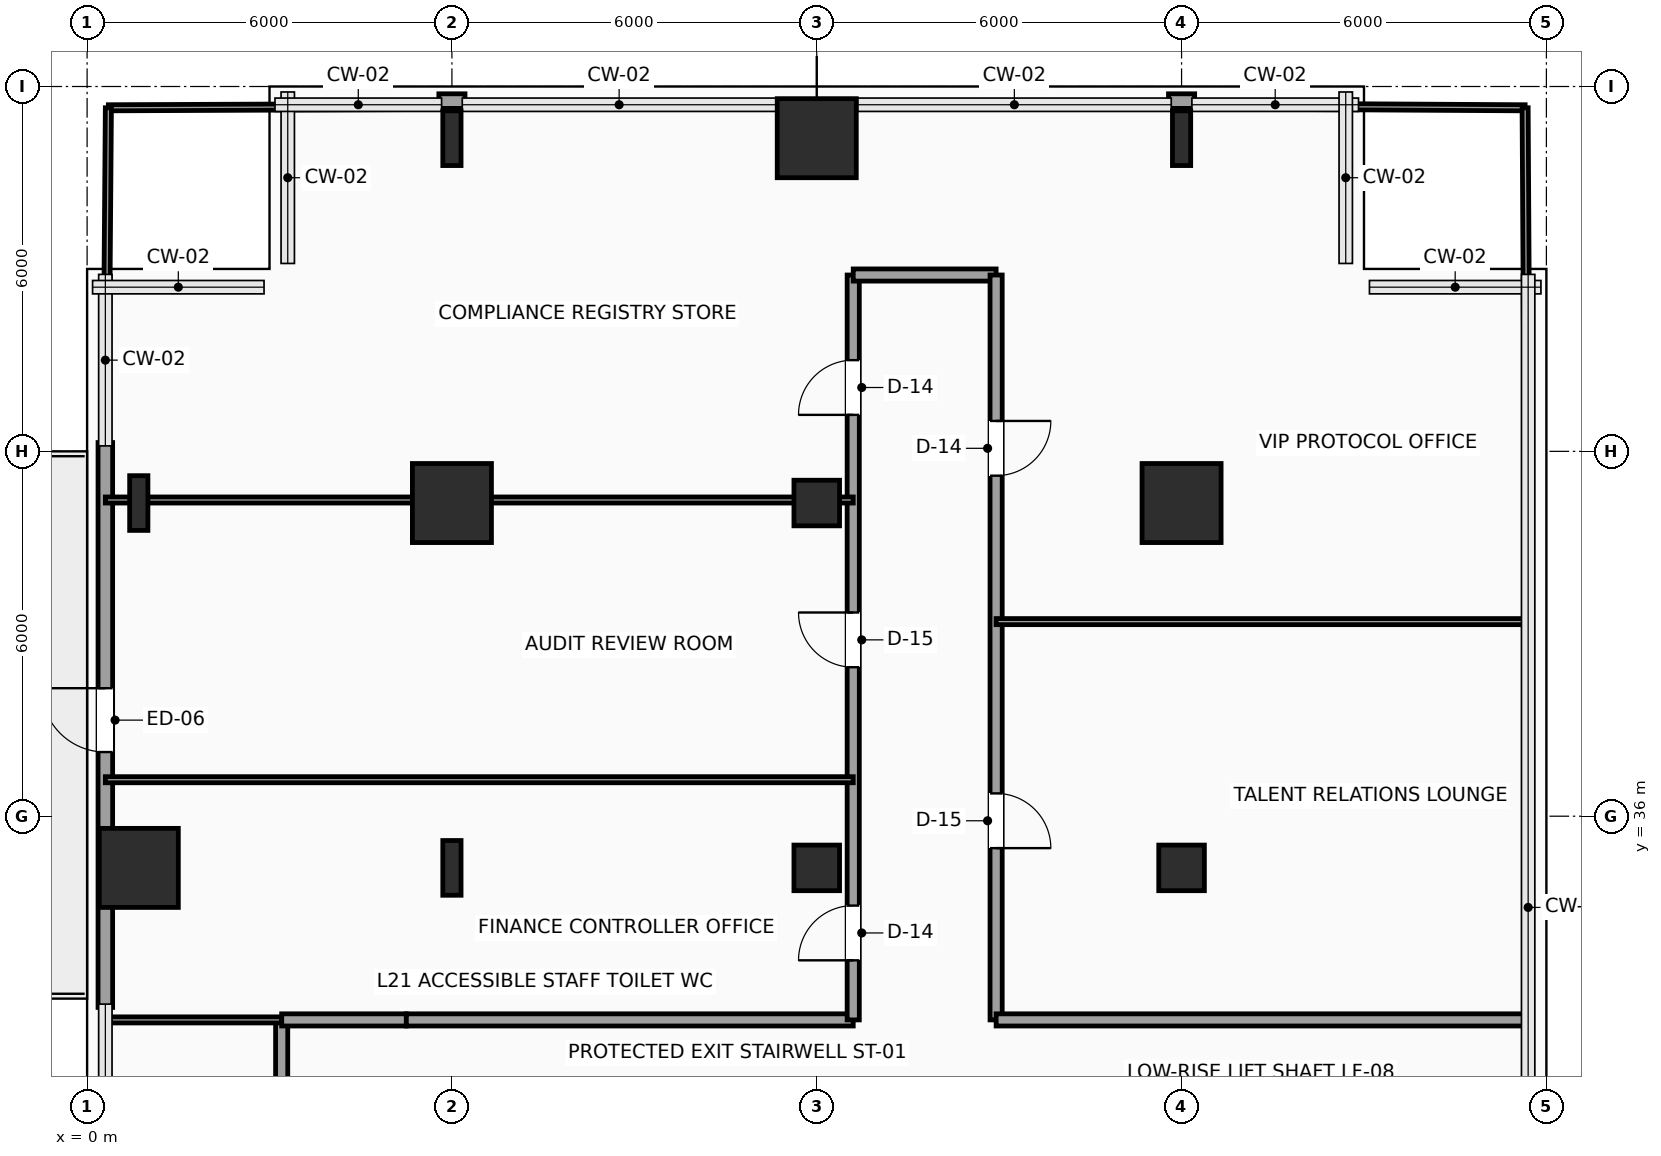
"""IFC4 building model, lengths in metres.
Left out: names, types, materials, properties, quantities, classifications, styles, units other than length and angle.
Written with IfcOpenShell. Run it as: python <this file> out.ifc"""

import sys

from ifc_helpers import new_model, si_unit, direction, frame, frame_2d, origin, origin_2d, place, context, subcontext, project, spatial, rectangle, hollow_rectangle, i_section, extrude, element, fill, save


model = new_model("IFC4")
c1 = context("Model", 3, precision=1e-05, world=origin(), true_north=direction((0.0, 1.0)))
c2 = subcontext(c1, "Body", "Model", "MODEL_VIEW")
j1 = project(units=[si_unit("LENGTHUNIT", "METRE"), si_unit("PLANEANGLEUNIT", "RADIAN")], contexts=[c1])
p1 = place(None, origin())
s1 = spatial("IfcSite", under=j1, at=p1, CompositionType="ELEMENT")
p2 = place(p1, origin())
s2 = spatial("IfcBuilding", under=s1, at=p2, CompositionType="ELEMENT")
p3 = place(p2, frame((0.0, 0.0, 90.9)))
s3 = spatial("IfcBuildingStorey", under=s2, at=p3, CompositionType="ELEMENT", Elevation=90.9)
p4 = place(p3, frame((0.85, 35.15, 0.0), z_axis=(0.0, 0.0, 1.0), x_axis=(1.0, 0.0, 0.0)))
e1 = element("IfcColumn", 1, at=p4, inside=s3, PredefinedType="COLUMN", context=c2, shape_type="SweptSolid", body=[
    extrude(rectangle(XDim=1.3, YDim=1.3, at=origin_2d()), origin(), (0.0, 0.0, 1.0), 3.9),
])
for number, where, z_axis, x_axis in (
    (2, (0.85, 41.15, 0.0), (0.0, 0.0, 1.0), (1.0, 0.0, 0.0)),
    (3, (6.0, 35.15, 0.0), (0.0, 0.0, 1.0), (1.0, 0.0, 0.0)),
):
    element("IfcColumn", number, at=place(p3, frame(where, z_axis=z_axis, x_axis=x_axis)), inside=s3, PredefinedType="COLUMN", context=c2, shape_type="SweptSolid", body=[
        extrude(i_section(OverallWidth=0.3, OverallDepth=0.9, WebThickness=0.019, FlangeThickness=0.035, FilletRadius=0.03, at=origin_2d()), origin(), (0.0, 0.0, 1.0), 3.9),
    ])
p5 = place(p3, frame((6.0, 41.15, 0.0), z_axis=(0.0, 0.0, 1.0), x_axis=(1.0, 0.0, 0.0)))
e4 = element("IfcColumn", 4, at=p5, inside=s3, PredefinedType="COLUMN", context=c2, shape_type="SweptSolid", body=[
    extrude(rectangle(XDim=1.3, YDim=1.3, at=origin_2d()), origin(), (0.0, 0.0, 1.0), 3.9),
])
p6 = place(p3, frame((6.0, 47.15, 0.0), z_axis=(0.0, 0.0, 1.0), x_axis=(1.0, 0.0, 0.0)))
e5 = element("IfcColumn", 5, at=p6, inside=s3, PredefinedType="COLUMN", context=c2, shape_type="SweptSolid", body=[
    extrude(i_section(OverallWidth=0.3, OverallDepth=0.9, WebThickness=0.019, FlangeThickness=0.035, FilletRadius=0.03, at=origin_2d()), origin(), (0.0, 0.0, 1.0), 3.9),
])
for number, where, z_axis, x_axis in (
    (6, (12.0, 35.15, 0.0), (0.0, 0.0, 1.0), (1.0, 0.0, 0.0)),
    (7, (12.0, 41.15, 0.0), (0.0, 0.0, 1.0), (1.0, 0.0, 0.0)),
):
    element("IfcColumn", number, at=place(p3, frame(where, z_axis=z_axis, x_axis=x_axis)), inside=s3, PredefinedType="COLUMN", context=c2, shape_type="SweptSolid", body=[
        extrude(hollow_rectangle(XDim=0.75, YDim=0.75, WallThickness=0.035, InnerFilletRadius=0.035, OuterFilletRadius=0.05, at=origin_2d()), origin(), (0.0, 0.0, 1.0), 3.9),
    ])
p7 = place(p3, frame((12.0, 47.15, 0.0), z_axis=(0.0, 0.0, 1.0), x_axis=(1.0, 0.0, 0.0)))
e8 = element("IfcColumn", 8, at=p7, inside=s3, PredefinedType="COLUMN", context=c2, shape_type="SweptSolid", body=[
    extrude(rectangle(XDim=1.3, YDim=1.3, at=origin_2d()), origin(), (0.0, 0.0, 1.0), 3.9),
])
p8 = place(p3, frame((18.0, 35.15, 0.0), z_axis=(0.0, 0.0, 1.0), x_axis=(1.0, 0.0, 0.0)))
e9 = element("IfcColumn", 9, at=p8, inside=s3, PredefinedType="COLUMN", context=c2, shape_type="SweptSolid", body=[
    extrude(hollow_rectangle(XDim=0.75, YDim=0.75, WallThickness=0.035, InnerFilletRadius=0.035, OuterFilletRadius=0.05, at=origin_2d()), origin(), (0.0, 0.0, 1.0), 3.9),
])
p9 = place(p3, frame((18.0, 41.15, 0.0), z_axis=(0.0, 0.0, 1.0), x_axis=(1.0, 0.0, 0.0)))
e10 = element("IfcColumn", 10, at=p9, inside=s3, PredefinedType="COLUMN", context=c2, shape_type="SweptSolid", body=[
    extrude(rectangle(XDim=1.3, YDim=1.3, at=origin_2d()), origin(), (0.0, 0.0, 1.0), 3.9),
])
p10 = place(p3, frame((18.0, 47.15, 0.0), z_axis=(0.0, 0.0, 1.0), x_axis=(1.0, 0.0, 0.0)))
e11 = element("IfcColumn", 11, at=p10, inside=s3, PredefinedType="COLUMN", context=c2, shape_type="SweptSolid", body=[
    extrude(i_section(OverallWidth=0.3, OverallDepth=0.9, WebThickness=0.019, FlangeThickness=0.035, FilletRadius=0.03, at=origin_2d()), origin(), (0.0, 0.0, 1.0), 3.9),
])
p11 = place(p3, frame((0.3, 32.855, 0.0), z_axis=(0.0, 0.0, 1.0), x_axis=(0.0, 1.0, 0.0)))
e12 = element("IfcWall", 12, at=p11, inside=s3, PredefinedType="SOLIDWALL", context=c2, shape_type="SweptSolid", body=[
    extrude(rectangle(XDim=9.29, YDim=0.24, at=frame_2d((4.645, 0.0))), origin(), (0.0, 0.0, 1.0), 3.575),
])
p12 = place(p11, frame((4.2, 0.0, 0.0)))
e13 = element("IfcOpeningElement", 13, at=p12, cuts=e12, PredefinedType="OPENING", context=c2, shape_type="SweptSolid", body=[
    extrude(rectangle(XDim=1.05, YDim=2.2, at=frame_2d((0.525, 1.1))), frame((0.0, 0.13, 0.0), z_axis=(0.0, -1.0, 0.0), x_axis=(1.0, 0.0, 0.0)), (0.0, 0.0, 1.0), 0.26),
])
for number, where, z_axis, x_axis in (
    (14, (5.785, 47.76, 0.0), (0.0, 0.0, 1.0), (1.0, 0.0, 0.0)),
    (15, (17.785, 47.76, 0.0), (0.0, 0.0, 1.0), (1.0, 0.0, 0.0)),
):
    element("IfcWall", number, at=place(p3, frame(where, z_axis=z_axis, x_axis=x_axis)), inside=s3, PredefinedType="SOLIDWALL", context=c2, shape_type="SweptSolid", body=[
        extrude(rectangle(XDim=0.43, YDim=0.24, at=frame_2d((0.215, 0.0))), origin(), (0.0, 0.0, 1.0), 3.575),
    ])
p13 = place(p3, frame((3.2, 30.25, 0.0), z_axis=(0.0, 0.0, 1.0), x_axis=(0.0, 1.0, 0.0)))
e16 = element("IfcWall", 16, at=p13, inside=s3, PredefinedType="SOLIDWALL", context=c2, shape_type="SweptSolid", body=[
    extrude(rectangle(XDim=2.4, YDim=0.2, at=frame_2d((1.2, 0.0))), origin(), (0.0, 0.0, 1.0), 3.575),
])
p14 = place(p3, frame((3.2, 32.65, 0.0), z_axis=(0.0, 0.0, 1.0), x_axis=(1.0, 0.0, 0.0)))
e17 = element("IfcWall", 17, at=p14, inside=s3, PredefinedType="SOLIDWALL", context=c2, shape_type="SweptSolid", body=[
    extrude(rectangle(XDim=2.05, YDim=0.2, at=frame_2d((1.025, 0.0))), origin(), (0.0, 0.0, 1.0), 3.575),
])
p15 = place(p3, frame((5.25, 32.65, 0.0), z_axis=(0.0, 0.0, 1.0), x_axis=(1.0, 0.0, 0.0)))
e18 = element("IfcWall", 18, at=p15, inside=s3, PredefinedType="SOLIDWALL", context=c2, shape_type="SweptSolid", body=[
    extrude(rectangle(XDim=7.35, YDim=0.2, at=frame_2d((3.675, 0.0))), origin(), (0.0, 0.0, 1.0), 3.575),
])
p16 = place(p3, frame((12.6, 32.65, 0.0), z_axis=(0.0, 0.0, 1.0), x_axis=(0.0, 1.0, 0.0)))
e19 = element("IfcWall", 19, at=p16, inside=s3, PredefinedType="SOLIDWALL", context=c2, shape_type="SweptSolid", body=[
    extrude(rectangle(XDim=12.25, YDim=0.2, at=frame_2d((6.125, 0.0))), origin(), (0.0, 0.0, 1.0), 3.575),
])
p17 = place(p16, frame((0.98, 0.0, 0.0)))
e20 = element("IfcOpeningElement", 20, at=p17, cuts=e19, PredefinedType="OPENING", context=c2, shape_type="SweptSolid", body=[
    extrude(rectangle(XDim=0.9, YDim=2.1, at=frame_2d((0.45, 1.05))), frame((0.0, 0.11, 0.0), z_axis=(0.0, -1.0, 0.0), x_axis=(1.0, 0.0, 0.0)), (0.0, 0.0, 1.0), 0.22),
])
p18 = place(p16, frame((5.8, 0.0, 0.0)))
e21 = element("IfcOpeningElement", 21, at=p18, cuts=e19, PredefinedType="OPENING", context=c2, shape_type="SweptSolid", body=[
    extrude(rectangle(XDim=0.9, YDim=2.1, at=frame_2d((0.45, 1.05))), frame((0.0, 0.11, 0.0), z_axis=(0.0, -1.0, 0.0), x_axis=(1.0, 0.0, 0.0)), (0.0, 0.0, 1.0), 0.22),
])
p19 = place(p16, frame((9.95, 0.0, 0.0)))
e22 = element("IfcOpeningElement", 22, at=p19, cuts=e19, PredefinedType="OPENING", context=c2, shape_type="SweptSolid", body=[
    extrude(rectangle(XDim=0.9, YDim=2.1, at=frame_2d((0.45, 1.05))), frame((0.0, 0.11, 0.0), z_axis=(0.0, -1.0, 0.0), x_axis=(1.0, 0.0, 0.0)), (0.0, 0.0, 1.0), 0.22),
])
p20 = place(p3, frame((12.6, 44.9, 0.0), z_axis=(0.0, 0.0, 1.0), x_axis=(1.0, 0.0, 0.0)))
e23 = element("IfcWall", 23, at=p20, inside=s3, PredefinedType="SOLIDWALL", context=c2, shape_type="SweptSolid", body=[
    extrude(rectangle(XDim=2.35, YDim=0.2, at=frame_2d((1.175, 0.0))), origin(), (0.0, 0.0, 1.0), 3.575),
])
p21 = place(p3, frame((14.95, 44.9, 0.0), z_axis=(0.0, 0.0, 1.0), x_axis=(0.0, -1.0, 0.0)))
e24 = element("IfcWall", 24, at=p21, inside=s3, PredefinedType="SOLIDWALL", context=c2, shape_type="SweptSolid", body=[
    extrude(rectangle(XDim=12.25, YDim=0.2, at=frame_2d((6.125, 0.0))), origin(), (0.0, 0.0, 1.0), 3.575),
])
p22 = place(p21, frame((8.525, 0.0, 0.0)))
e25 = element("IfcOpeningElement", 25, at=p22, cuts=e24, PredefinedType="OPENING", context=c2, shape_type="SweptSolid", body=[
    extrude(rectangle(XDim=0.9, YDim=2.1, at=frame_2d((0.45, 1.05))), frame((0.0, 0.11, 0.0), z_axis=(0.0, -1.0, 0.0), x_axis=(1.0, 0.0, 0.0)), (0.0, 0.0, 1.0), 0.22),
])
p23 = place(p21, frame((2.4, 0.0, 0.0)))
e26 = element("IfcOpeningElement", 26, at=p23, cuts=e24, PredefinedType="OPENING", context=c2, shape_type="SweptSolid", body=[
    extrude(rectangle(XDim=0.9, YDim=2.1, at=frame_2d((0.45, 1.05))), frame((0.0, 0.11, 0.0), z_axis=(0.0, -1.0, 0.0), x_axis=(1.0, 0.0, 0.0)), (0.0, 0.0, 1.0), 0.22),
])
p24 = place(p3, frame((14.95, 32.65, 0.0), z_axis=(0.0, 0.0, 1.0), x_axis=(1.0, 0.0, 0.0)))
e27 = element("IfcWall", 27, at=p24, inside=s3, PredefinedType="SOLIDWALL", context=c2, shape_type="SweptSolid", body=[
    extrude(rectangle(XDim=8.75, YDim=0.2, at=frame_2d((4.375, 0.0))), origin(), (0.0, 0.0, 1.0), 3.575),
])
p25 = place(p3, frame((0.3, 36.6, 0.0), z_axis=(0.0, 0.0, 1.0), x_axis=(1.0, 0.0, 0.0)))
e28 = element("IfcWall", 28, at=p25, inside=s3, PredefinedType="PARTITIONING", context=c2, shape_type="SweptSolid", body=[
    extrude(rectangle(XDim=12.3, YDim=0.1, at=frame_2d((6.15, 0.0))), origin(), (0.0, 0.0, 1.0), 3.575),
])
p26 = place(p3, frame((0.3, 41.2, 0.0), z_axis=(0.0, 0.0, 1.0), x_axis=(1.0, 0.0, 0.0)))
e29 = element("IfcWall", 29, at=p26, inside=s3, PredefinedType="PARTITIONING", context=c2, shape_type="SweptSolid", body=[
    extrude(rectangle(XDim=12.3, YDim=0.1, at=frame_2d((6.15, 0.0))), origin(), (0.0, 0.0, 1.0), 2.917),
])
p27 = place(p3, frame((0.35, 47.65, 0.0), z_axis=(0.0, 0.0, 1.0), x_axis=(0.999991644778, 0.004087832518, 0.0)))
e30 = element("IfcWall", 30, at=p27, inside=s3, PredefinedType="PARTITIONING", context=c2, shape_type="SweptSolid", body=[
    extrude(rectangle(XDim=5.435, YDim=0.1, at=frame_2d((2.717, 0.0))), origin(), (0.0, 0.0, 1.0), 3.575),
])
p28 = place(p3, frame((6.215, 47.674, 0.0), z_axis=(0.0, 0.0, 1.0), x_axis=(0.999991630701, 0.004091274595, 0.0)))
e31 = element("IfcWall", 31, at=p28, inside=s3, PredefinedType="PARTITIONING", context=c2, shape_type="SweptSolid", body=[
    extrude(rectangle(XDim=6.385, YDim=0.1, at=frame_2d((3.192, 0.0))), origin(), (0.0, 0.0, 1.0), 3.575),
])
p29 = place(p3, frame((0.307, 42.145, 0.0), z_axis=(0.0, 0.0, 1.0), x_axis=(0.007760986763, 0.999969883089, 0.0)))
e32 = element("IfcWall", 32, at=p29, inside=s3, PredefinedType="PARTITIONING", context=c2, shape_type="SweptSolid", body=[
    extrude(rectangle(XDim=5.505, YDim=0.1, at=frame_2d((2.752, 0.0))), origin(), (0.0, 0.0, 1.0), 3.575),
])
p30 = place(p3, frame((14.95, 39.2, 0.0), z_axis=(0.0, 0.0, 1.0), x_axis=(1.0, 0.0, 0.0)))
e33 = element("IfcWall", 33, at=p30, inside=s3, PredefinedType="PARTITIONING", context=c2, shape_type="SweptSolid", body=[
    extrude(rectangle(XDim=8.75, YDim=0.1, at=frame_2d((4.375, 0.0))), origin(), (0.0, 0.0, 1.0), 3.575),
])
p31 = place(p3, frame((14.95, 47.7, 0.0), z_axis=(0.0, 0.0, 1.0), x_axis=(0.999983354582, -0.005769797172, 0.0)))
e34 = element("IfcWall", 34, at=p31, inside=s3, PredefinedType="PARTITIONING", context=c2, shape_type="SweptSolid", body=[
    extrude(rectangle(XDim=2.835, YDim=0.1, at=frame_2d((1.417, 0.0))), origin(), (0.0, 0.0, 1.0), 3.575),
])
p32 = place(p3, frame((18.215, 47.681, 0.0), z_axis=(0.0, 0.0, 1.0), x_axis=(0.999983469354, -0.005749871258, 0.0)))
e35 = element("IfcWall", 35, at=p32, inside=s3, PredefinedType="PARTITIONING", context=c2, shape_type="SweptSolid", body=[
    extrude(rectangle(XDim=5.435, YDim=0.1, at=frame_2d((2.717, 0.0))), origin(), (0.0, 0.0, 1.0), 3.575),
])
p33 = place(p3, frame((23.7, 39.2, 0.0), z_axis=(0.0, 0.0, 1.0), x_axis=(-0.005922868574, 0.99998245966, 0.0)))
e36 = element("IfcWall", 36, at=p33, inside=s3, PredefinedType="PARTITIONING", context=c2, shape_type="SweptSolid", body=[
    extrude(rectangle(XDim=8.45, YDim=0.1, at=frame_2d((4.225, 0.0))), origin(), (0.0, 0.0, 1.0), 3.575),
])
p34 = place(p3, frame((0.3, 32.65, 0.0), z_axis=(0.0, 0.0, 1.0), x_axis=(1.0, 0.0, 0.0)))
e37 = element("IfcWall", 37, at=p34, inside=s3, PredefinedType="PARTITIONING", context=c2, shape_type="SweptSolid", body=[
    extrude(rectangle(XDim=2.9, YDim=0.1, at=frame_2d((1.45, 0.0))), origin(), (0.0, 0.0, 1.0), 3.575),
])
p35 = place(p12, origin())
e38 = element("IfcDoor", 38, at=p35, inside=s3, OperationType="SINGLE_SWING_RIGHT", PredefinedType="DOOR", context=c2, shape_type="SweptSolid", body=[
    extrude(rectangle(XDim=1.05, YDim=2.2, at=frame_2d((0.525, 1.1))), frame((0.0, 0.025, 0.0), z_axis=(0.0, -1.0, 0.0), x_axis=(1.0, 0.0, 0.0)), (0.0, 0.0, 1.0), 0.05),
])
fill(e13, e38)
p36 = place(p17, origin())
e39 = element("IfcDoor", 39, at=p36, inside=s3, OperationType="SINGLE_SWING_LEFT", PredefinedType="DOOR", context=c2, shape_type="SweptSolid", body=[
    extrude(rectangle(XDim=0.9, YDim=2.1, at=frame_2d((0.45, 1.05))), frame((0.0, 0.025, 0.0), z_axis=(0.0, -1.0, 0.0), x_axis=(1.0, 0.0, 0.0)), (0.0, 0.0, 1.0), 0.05),
])
fill(e20, e39)
p37 = place(p18, origin())
e40 = element("IfcDoor", 40, at=p37, inside=s3, OperationType="SINGLE_SWING_RIGHT", PredefinedType="DOOR", context=c2, shape_type="SweptSolid", body=[
    extrude(rectangle(XDim=0.9, YDim=2.1, at=frame_2d((0.45, 1.05))), frame((0.0, 0.025, 0.0), z_axis=(0.0, -1.0, 0.0), x_axis=(1.0, 0.0, 0.0)), (0.0, 0.0, 1.0), 0.05),
])
fill(e21, e40)
p38 = place(p19, origin())
e41 = element("IfcDoor", 41, at=p38, inside=s3, OperationType="SINGLE_SWING_LEFT", PredefinedType="DOOR", context=c2, shape_type="SweptSolid", body=[
    extrude(rectangle(XDim=0.9, YDim=2.1, at=frame_2d((0.45, 1.05))), frame((0.0, 0.025, 0.0), z_axis=(0.0, -1.0, 0.0), x_axis=(1.0, 0.0, 0.0)), (0.0, 0.0, 1.0), 0.05),
])
fill(e22, e41)
p39 = place(p22, origin())
e42 = element("IfcDoor", 42, at=p39, inside=s3, OperationType="SINGLE_SWING_RIGHT", PredefinedType="DOOR", context=c2, shape_type="SweptSolid", body=[
    extrude(rectangle(XDim=0.9, YDim=2.1, at=frame_2d((0.45, 1.05))), frame((0.0, 0.025, 0.0), z_axis=(0.0, -1.0, 0.0), x_axis=(1.0, 0.0, 0.0)), (0.0, 0.0, 1.0), 0.05),
])
fill(e25, e42)
p40 = place(p23, origin())
e43 = element("IfcDoor", 43, at=p40, inside=s3, OperationType="SINGLE_SWING_LEFT", PredefinedType="DOOR", context=c2, shape_type="SweptSolid", body=[
    extrude(rectangle(XDim=0.9, YDim=2.1, at=frame_2d((0.45, 1.05))), frame((0.0, 0.025, 0.0), z_axis=(0.0, -1.0, 0.0), x_axis=(1.0, 0.0, 0.0)), (0.0, 0.0, 1.0), 0.05),
])
fill(e26, e43)
save(model, sys.argv[1])
